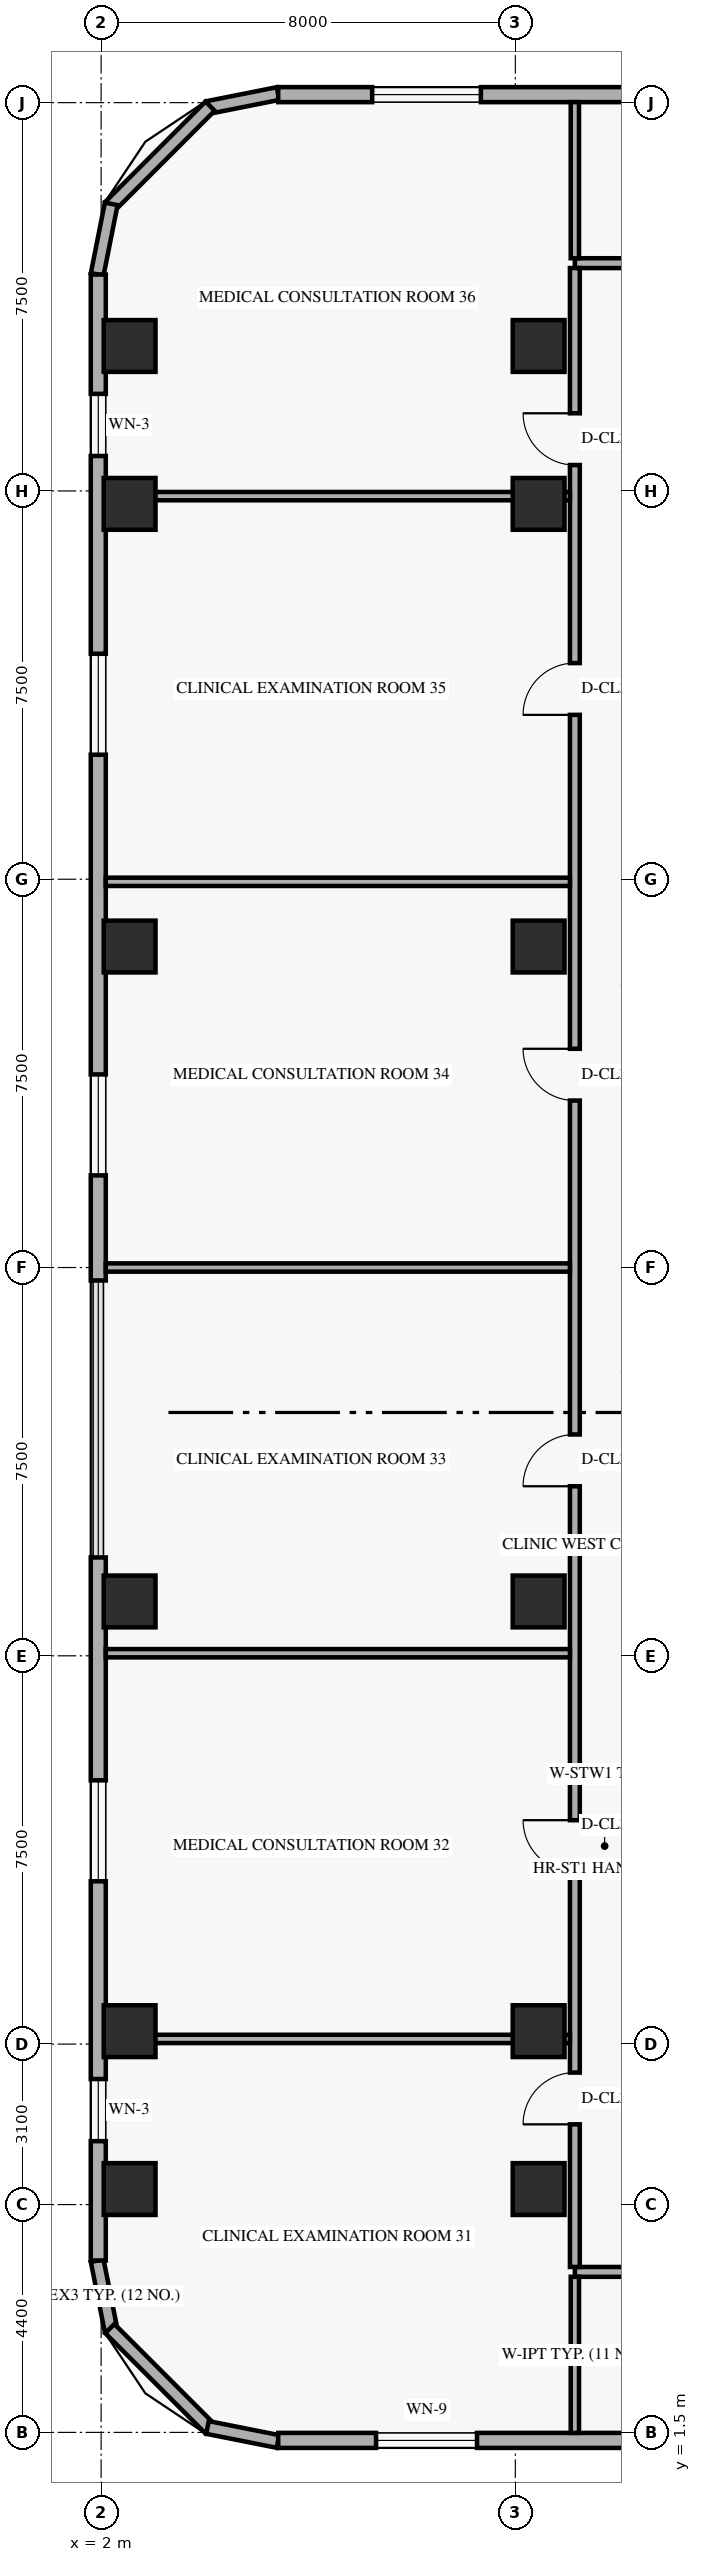
"""IFC4 building model, lengths in metres.
Left out: names, types, materials, properties, quantities, classifications, styles, units other than length and angle.
Written with IfcOpenShell. Run it as: python <this file> out.ifc"""

import sys

from ifc_helpers import new_model, si_unit, direction, frame, frame_2d, origin, origin_2d, place, context, subcontext, project, spatial, rectangle, extrude, element, fill, save


model = new_model("IFC4")
c1 = context("Model", 3, precision=1e-05, world=origin(), true_north=direction((0.0, 1.0)))
c2 = subcontext(c1, "Body", "Model", "MODEL_VIEW")
j1 = project(units=[si_unit("LENGTHUNIT", "METRE"), si_unit("PLANEANGLEUNIT", "RADIAN")], contexts=[c1])
p1 = place(None, origin())
s1 = spatial("IfcSite", under=j1, at=p1, CompositionType="ELEMENT")
p2 = place(p1, origin())
s2 = spatial("IfcBuilding", under=s1, at=p2, CompositionType="ELEMENT")
p3 = place(p2, frame((0.0, 0.0, 14.4)))
s3 = spatial("IfcBuildingStorey", under=s2, at=p3, CompositionType="ELEMENT", Elevation=14.4)
for number, where, z_axis, x_axis in (
    (1, (2.55, 6.2, 0.0), (0.0, 0.0, 1.0), (1.0, 0.0, 0.0)),
    (2, (2.55, 9.25, 0.0), (0.0, 0.0, 1.0), (1.0, 0.0, 0.0)),
    (3, (2.55, 17.55, 0.0), (0.0, 0.0, 1.0), (1.0, 0.0, 0.0)),
    (4, (2.55, 30.2, 0.0), (0.0, 0.0, 1.0), (1.0, 0.0, 0.0)),
    (5, (2.55, 38.75, 0.0), (0.0, 0.0, 1.0), (1.0, 0.0, 0.0)),
    (6, (2.55, 41.8, 0.0), (0.0, 0.0, 1.0), (1.0, 0.0, 0.0)),
    (7, (10.45, 6.2, 0.0), (0.0, 0.0, 1.0), (1.0, 0.0, 0.0)),
    (8, (10.45, 9.25, 0.0), (0.0, 0.0, 1.0), (1.0, 0.0, 0.0)),
    (9, (10.45, 17.55, 0.0), (0.0, 0.0, 1.0), (1.0, 0.0, 0.0)),
    (10, (10.45, 30.2, 0.0), (0.0, 0.0, 1.0), (1.0, 0.0, 0.0)),
    (11, (10.45, 38.75, 0.0), (0.0, 0.0, 1.0), (1.0, 0.0, 0.0)),
    (12, (10.45, 41.8, 0.0), (0.0, 0.0, 1.0), (1.0, 0.0, 0.0)),
):
    element("IfcColumn", number, at=place(p3, frame(where, z_axis=z_axis, x_axis=x_axis)), inside=s3, PredefinedType="COLUMN", context=c2, shape_type="SweptSolid", body=[
        extrude(rectangle(XDim=1.0, YDim=1.0, at=origin_2d()), origin(), (0.0, 0.0, 1.0), 4.8),
    ])
p4 = place(p3, frame((1.924, 4.816, 0.0), z_axis=(0.0, 0.0, 1.0), x_axis=(0.195000137217, -0.980803214965, 0.0)))
e13 = element("IfcWall", 13, at=p4, inside=s3, PredefinedType="SOLIDWALL", context=c2, shape_type="SweptSolid", body=[
    extrude(rectangle(XDim=1.388, YDim=0.25, at=frame_2d((0.694, 0.0))), origin(), (0.0, 0.0, 1.0), 4.39),
])
p5 = place(p3, frame((2.168, 3.505, 0.0), z_axis=(0.0, 0.0, 1.0), x_axis=(0.707151344399, -0.707062215165, 0.0)))
e14 = element("IfcWall", 14, at=p5, inside=s3, PredefinedType="SOLIDWALL", context=c2, shape_type="SweptSolid", body=[
    extrude(rectangle(XDim=2.739, YDim=0.25, at=frame_2d((1.37, 0.0))), origin(), (0.0, 0.0, 1.0), 4.39),
])
for number, where, z_axis, x_axis in (
    (15, (4.054, 1.595, 0.0), (0.0, 0.0, 1.0), (0.981, -0.195, 0.0)),
    (16, (5.417, 46.676, 0.0), (0.0, 0.0, 1.0), (-0.981, -0.195, 0.0)),
):
    element("IfcWall", number, at=place(p3, frame(where, z_axis=z_axis, x_axis=x_axis)), inside=s3, PredefinedType="SOLIDWALL", context=c2, shape_type="SweptSolid", body=[
        extrude(rectangle(XDim=1.389, YDim=0.25, at=frame_2d((0.694, 0.0))), origin(), (0.0, 0.0, 1.0), 4.39),
    ])
p6 = place(p3, frame((4.105, 46.432, 0.0), z_axis=(0.0, 0.0, 1.0), x_axis=(-0.707151344399, -0.707062215165, 0.0)))
e17 = element("IfcWall", 17, at=p6, inside=s3, PredefinedType="SOLIDWALL", context=c2, shape_type="SweptSolid", body=[
    extrude(rectangle(XDim=2.739, YDim=0.25, at=frame_2d((1.37, 0.0))), origin(), (0.0, 0.0, 1.0), 4.39),
])
p7 = place(p3, frame((2.195, 44.545, 0.0), z_axis=(0.0, 0.0, 1.0), x_axis=(-0.195000137217, -0.980803214965, 0.0)))
e18 = element("IfcWall", 18, at=p7, inside=s3, PredefinedType="SOLIDWALL", context=c2, shape_type="SweptSolid", body=[
    extrude(rectangle(XDim=1.388, YDim=0.25, at=frame_2d((0.694, 0.0))), origin(), (0.0, 0.0, 1.0), 4.39),
])
p8 = place(p3, frame((5.42, 1.345, 0.0), z_axis=(0.0, 0.0, 1.0), x_axis=(1.0, 0.0, 0.0)))
e19 = element("IfcWall", 19, at=p8, inside=s3, PredefinedType="SOLIDWALL", context=c2, shape_type="SweptSolid", body=[
    extrude(rectangle(XDim=19.58, YDim=0.29, at=frame_2d((9.79, 0.0))), origin(), (0.0, 0.0, 1.0), 4.39),
])
p9 = place(p8, frame((1.89, 0.0, 0.85)))
e20 = element("IfcOpeningElement", 20, at=p9, cuts=e19, PredefinedType="OPENING", context=c2, shape_type="SweptSolid", body=[
    extrude(rectangle(XDim=1.95, YDim=1.75, at=frame_2d((0.975, 0.875))), frame((0.0, 0.155, 0.0), z_axis=(0.0, -1.0, 0.0), x_axis=(1.0, 0.0, 0.0)), (0.0, 0.0, 1.0), 0.31),
])
p10 = place(p8, frame((11.68, 0.0, 0.85)))
e21 = element("IfcOpeningElement", 21, at=p10, cuts=e19, PredefinedType="OPENING", context=c2, shape_type="SweptSolid", body=[
    extrude(rectangle(XDim=1.95, YDim=1.75, at=frame_2d((0.975, 0.875))), frame((0.0, 0.155, 0.0), z_axis=(0.0, -1.0, 0.0), x_axis=(1.0, 0.0, 0.0)), (0.0, 0.0, 1.0), 0.31),
])
p11 = place(p3, frame((48.18, 46.655, 0.0), z_axis=(0.0, 0.0, 1.0), x_axis=(-1.0, 0.0, 0.0)))
e22 = element("IfcWall", 22, at=p11, inside=s3, PredefinedType="SOLIDWALL", context=c2, shape_type="SweptSolid", body=[
    extrude(rectangle(XDim=42.76, YDim=0.29, at=frame_2d((21.38, 0.0))), origin(), (0.0, 0.0, 1.0), 4.39),
])
p12 = place(p11, frame((38.845, 0.0, 0.85)))
e23 = element("IfcOpeningElement", 23, at=p12, cuts=e22, PredefinedType="OPENING", context=c2, shape_type="SweptSolid", body=[
    extrude(rectangle(XDim=2.1, YDim=1.75, at=frame_2d((1.05, 0.875))), frame((0.0, 0.155, 0.0), z_axis=(0.0, -1.0, 0.0), x_axis=(1.0, 0.0, 0.0)), (0.0, 0.0, 1.0), 0.31),
])
p13 = place(p11, frame((22.78, 0.0, 0.85)))
e24 = element("IfcOpeningElement", 24, at=p13, cuts=e22, PredefinedType="OPENING", context=c2, shape_type="SweptSolid", body=[
    extrude(rectangle(XDim=2.1, YDim=1.75, at=frame_2d((1.05, 0.875))), frame((0.0, 0.155, 0.0), z_axis=(0.0, -1.0, 0.0), x_axis=(1.0, 0.0, 0.0)), (0.0, 0.0, 1.0), 0.31),
])
p14 = place(p11, frame((4.265, 0.0, 0.85)))
e25 = element("IfcOpeningElement", 25, at=p14, cuts=e22, PredefinedType="OPENING", context=c2, shape_type="SweptSolid", body=[
    extrude(rectangle(XDim=2.1, YDim=1.75, at=frame_2d((1.05, 0.875))), frame((0.0, 0.155, 0.0), z_axis=(0.0, -1.0, 0.0), x_axis=(1.0, 0.0, 0.0)), (0.0, 0.0, 1.0), 0.31),
])
p15 = place(p3, frame((1.945, 43.18, 0.0), z_axis=(0.0, 0.0, 1.0), x_axis=(0.0, -1.0, 0.0)))
e26 = element("IfcWall", 26, at=p15, inside=s3, PredefinedType="SOLIDWALL", context=c2, shape_type="SweptSolid", body=[
    extrude(rectangle(XDim=19.43, YDim=0.29, at=frame_2d((9.715, 0.0))), origin(), (0.0, 0.0, 1.0), 4.39),
])
p16 = place(p15, frame((15.45, 0.0, 0.85)))
e27 = element("IfcOpeningElement", 27, at=p16, cuts=e26, PredefinedType="OPENING", context=c2, shape_type="SweptSolid", body=[
    extrude(rectangle(XDim=1.95, YDim=1.75, at=frame_2d((0.975, 0.875))), frame((0.0, 0.155, 0.0), z_axis=(0.0, -1.0, 0.0), x_axis=(1.0, 0.0, 0.0)), (0.0, 0.0, 1.0), 0.31),
])
p17 = place(p15, frame((7.325, 0.0, 0.85)))
e28 = element("IfcOpeningElement", 28, at=p17, cuts=e26, PredefinedType="OPENING", context=c2, shape_type="SweptSolid", body=[
    extrude(rectangle(XDim=1.95, YDim=1.75, at=frame_2d((0.975, 0.875))), frame((0.0, 0.155, 0.0), z_axis=(0.0, -1.0, 0.0), x_axis=(1.0, 0.0, 0.0)), (0.0, 0.0, 1.0), 0.31),
])
p18 = place(p15, frame((2.305, 0.0, 0.85)))
e29 = element("IfcOpeningElement", 29, at=p18, cuts=e26, PredefinedType="OPENING", context=c2, shape_type="SweptSolid", body=[
    extrude(rectangle(XDim=1.2, YDim=1.5, at=frame_2d((0.6, 0.75))), frame((0.0, 0.155, 0.0), z_axis=(0.0, -1.0, 0.0), x_axis=(1.0, 0.0, 0.0)), (0.0, 0.0, 1.0), 0.31),
])
p19 = place(p3, frame((1.945, 18.4, 0.0), z_axis=(0.0, 0.0, 1.0), x_axis=(0.0, -1.0, 0.0)))
e30 = element("IfcWall", 30, at=p19, inside=s3, PredefinedType="SOLIDWALL", context=c2, shape_type="SweptSolid", body=[
    extrude(rectangle(XDim=13.58, YDim=0.29, at=frame_2d((6.79, 0.0))), origin(), (0.0, 0.0, 1.0), 4.39),
])
p20 = place(p19, frame((10.075, 0.0, 0.85)))
e31 = element("IfcOpeningElement", 31, at=p20, cuts=e30, PredefinedType="OPENING", context=c2, shape_type="SweptSolid", body=[
    extrude(rectangle(XDim=1.2, YDim=1.5, at=frame_2d((0.6, 0.75))), frame((0.0, 0.155, 0.0), z_axis=(0.0, -1.0, 0.0), x_axis=(1.0, 0.0, 0.0)), (0.0, 0.0, 1.0), 0.31),
])
p21 = place(p19, frame((4.305, 0.0, 0.85)))
e32 = element("IfcOpeningElement", 32, at=p21, cuts=e30, PredefinedType="OPENING", context=c2, shape_type="SweptSolid", body=[
    extrude(rectangle(XDim=1.95, YDim=1.75, at=frame_2d((0.975, 0.875))), frame((0.0, 0.155, 0.0), z_axis=(0.0, -1.0, 0.0), x_axis=(1.0, 0.0, 0.0)), (0.0, 0.0, 1.0), 0.31),
])
for number, where, z_axis, x_axis in (
    (33, (11.15, 4.6, 0.0), (0.0, 0.0, 1.0), (1.0, 0.0, 0.0)),
    (34, (11.15, 43.4, 0.0), (0.0, 0.0, 1.0), (1.0, 0.0, 0.0)),
):
    element("IfcWall", number, at=place(p3, frame(where, z_axis=z_axis, x_axis=x_axis)), inside=s3, PredefinedType="STANDARD", context=c2, shape_type="SweptSolid", body=[
        extrude(rectangle(XDim=1.85, YDim=0.19, at=frame_2d((0.925, 0.0))), origin(), (0.0, 0.0, 1.0), 4.39),
    ])
p22 = place(p3, frame((11.15, 4.695, 0.0), z_axis=(0.0, 0.0, 1.0), x_axis=(0.0, 1.0, 0.0)))
e35 = element("IfcWall", 35, at=p22, inside=s3, PredefinedType="STANDARD", context=c2, shape_type="SweptSolid", body=[
    extrude(rectangle(XDim=38.61, YDim=0.19, at=frame_2d((19.305, 0.0))), origin(), (0.0, 0.0, 1.0), 3.445),
])
p23 = place(p22, frame((2.755, 0.0, 0.0)))
e36 = element("IfcOpeningElement", 36, at=p23, cuts=e35, PredefinedType="OPENING", context=c2, shape_type="SweptSolid", body=[
    extrude(rectangle(XDim=1.0, YDim=2.15, at=frame_2d((0.5, 1.075))), frame((0.0, 0.105, 0.0), z_axis=(0.0, -1.0, 0.0), x_axis=(1.0, 0.0, 0.0)), (0.0, 0.0, 1.0), 0.21),
])
p24 = place(p22, frame((7.63, 0.0, 0.0)))
e37 = element("IfcOpeningElement", 37, at=p24, cuts=e35, PredefinedType="OPENING", context=c2, shape_type="SweptSolid", body=[
    extrude(rectangle(XDim=1.0, YDim=2.15, at=frame_2d((0.5, 1.075))), frame((0.0, 0.105, 0.0), z_axis=(0.0, -1.0, 0.0), x_axis=(1.0, 0.0, 0.0)), (0.0, 0.0, 1.0), 0.21),
])
p25 = place(p22, frame((15.08, 0.0, 0.0)))
e38 = element("IfcOpeningElement", 38, at=p25, cuts=e35, PredefinedType="OPENING", context=c2, shape_type="SweptSolid", body=[
    extrude(rectangle(XDim=1.0, YDim=2.15, at=frame_2d((0.5, 1.075))), frame((0.0, 0.105, 0.0), z_axis=(0.0, -1.0, 0.0), x_axis=(1.0, 0.0, 0.0)), (0.0, 0.0, 1.0), 0.21),
])
p26 = place(p22, frame((22.53, 0.0, 0.0)))
e39 = element("IfcOpeningElement", 39, at=p26, cuts=e35, PredefinedType="OPENING", context=c2, shape_type="SweptSolid", body=[
    extrude(rectangle(XDim=1.0, YDim=2.15, at=frame_2d((0.5, 1.075))), frame((0.0, 0.105, 0.0), z_axis=(0.0, -1.0, 0.0), x_axis=(1.0, 0.0, 0.0)), (0.0, 0.0, 1.0), 0.21),
])
p27 = place(p22, frame((29.98, 0.0, 0.0)))
e40 = element("IfcOpeningElement", 40, at=p27, cuts=e35, PredefinedType="OPENING", context=c2, shape_type="SweptSolid", body=[
    extrude(rectangle(XDim=1.0, YDim=2.15, at=frame_2d((0.5, 1.075))), frame((0.0, 0.105, 0.0), z_axis=(0.0, -1.0, 0.0), x_axis=(1.0, 0.0, 0.0)), (0.0, 0.0, 1.0), 0.21),
])
p28 = place(p22, frame((34.805, 0.0, 0.0)))
e41 = element("IfcOpeningElement", 41, at=p28, cuts=e35, PredefinedType="OPENING", context=c2, shape_type="SweptSolid", body=[
    extrude(rectangle(XDim=1.0, YDim=2.15, at=frame_2d((0.5, 1.075))), frame((0.0, 0.105, 0.0), z_axis=(0.0, -1.0, 0.0), x_axis=(1.0, 0.0, 0.0)), (0.0, 0.0, 1.0), 0.21),
])
for number, where, z_axis, x_axis in (
    (42, (11.15, 1.49, 0.0), (0.0, 0.0, 1.0), (0.0, 1.0, 0.0)),
    (43, (11.15, 43.495, 0.0), (0.0, 0.0, 1.0), (0.0, 1.0, 0.0)),
):
    element("IfcWall", number, at=place(p3, frame(where, z_axis=z_axis, x_axis=x_axis)), inside=s3, PredefinedType="PARTITIONING", context=c2, shape_type="SweptSolid", body=[
        extrude(rectangle(XDim=3.015, YDim=0.16, at=frame_2d((1.507, 0.0))), origin(), (0.0, 0.0, 1.0), 4.39),
    ])
p29 = place(p3, frame((2.09, 9.1, 0.0), z_axis=(0.0, 0.0, 1.0), x_axis=(1.0, 0.0, 0.0)))
e44 = element("IfcWall", 44, at=p29, inside=s3, PredefinedType="PARTITIONING", context=c2, shape_type="SweptSolid", body=[
    extrude(rectangle(XDim=8.965, YDim=0.16, at=frame_2d((4.482, 0.0))), origin(), (0.0, 0.0, 1.0), 3.445),
])
for number, where, z_axis, x_axis in (
    (45, (2.09, 16.55, 0.0), (0.0, 0.0, 1.0), (1.0, 0.0, 0.0)),
    (46, (2.09, 24.0, 0.0), (0.0, 0.0, 1.0), (1.0, 0.0, 0.0)),
    (47, (2.09, 31.45, 0.0), (0.0, 0.0, 1.0), (1.0, 0.0, 0.0)),
):
    element("IfcWall", number, at=place(p3, frame(where, z_axis=z_axis, x_axis=x_axis)), inside=s3, PredefinedType="PARTITIONING", context=c2, shape_type="SweptSolid", body=[
        extrude(rectangle(XDim=8.965, YDim=0.16, at=frame_2d((4.482, 0.0))), origin(), (0.0, 0.0, 1.0), 3.602),
    ])
p30 = place(p3, frame((2.09, 38.9, 0.0), z_axis=(0.0, 0.0, 1.0), x_axis=(1.0, 0.0, 0.0)))
e48 = element("IfcWall", 48, at=p30, inside=s3, PredefinedType="PARTITIONING", context=c2, shape_type="SweptSolid", body=[
    extrude(rectangle(XDim=8.965, YDim=0.16, at=frame_2d((4.482, 0.0))), origin(), (0.0, 0.0, 1.0), 3.445),
])
p31 = place(p9, origin())
e49 = element("IfcWindow", 49, at=p31, inside=s3, PartitioningType="SINGLE_PANEL", PredefinedType="WINDOW", context=c2, shape_type="SweptSolid", body=[
    extrude(rectangle(XDim=1.95, YDim=1.75, at=frame_2d((0.975, 0.875))), frame((0.0, 0.03, 0.0), z_axis=(0.0, -1.0, 0.0), x_axis=(1.0, 0.0, 0.0)), (0.0, 0.0, 1.0), 0.06),
])
fill(e20, e49)
p32 = place(p12, origin())
e50 = element("IfcWindow", 50, at=p32, inside=s3, PartitioningType="SINGLE_PANEL", PredefinedType="WINDOW", context=c2, shape_type="SweptSolid", body=[
    extrude(rectangle(XDim=2.1, YDim=1.75, at=frame_2d((1.05, 0.875))), frame((0.0, 0.03, 0.0), z_axis=(0.0, -1.0, 0.0), x_axis=(1.0, 0.0, 0.0)), (0.0, 0.0, 1.0), 0.06),
])
fill(e23, e50)
p33 = place(p16, origin())
e51 = element("IfcWindow", 51, at=p33, inside=s3, PartitioningType="SINGLE_PANEL", PredefinedType="WINDOW", context=c2, shape_type="SweptSolid", body=[
    extrude(rectangle(XDim=1.95, YDim=1.75, at=frame_2d((0.975, 0.875))), frame((0.0, 0.03, 0.0), z_axis=(0.0, -1.0, 0.0), x_axis=(1.0, 0.0, 0.0)), (0.0, 0.0, 1.0), 0.06),
])
fill(e27, e51)
p34 = place(p17, origin())
e52 = element("IfcWindow", 52, at=p34, inside=s3, PartitioningType="SINGLE_PANEL", PredefinedType="WINDOW", context=c2, shape_type="SweptSolid", body=[
    extrude(rectangle(XDim=1.95, YDim=1.75, at=frame_2d((0.975, 0.875))), frame((0.0, 0.03, 0.0), z_axis=(0.0, -1.0, 0.0), x_axis=(1.0, 0.0, 0.0)), (0.0, 0.0, 1.0), 0.06),
])
fill(e28, e52)
p35 = place(p18, origin())
e53 = element("IfcWindow", 53, at=p35, inside=s3, PartitioningType="SINGLE_PANEL", PredefinedType="WINDOW", context=c2, shape_type="SweptSolid", body=[
    extrude(rectangle(XDim=1.2, YDim=1.5, at=frame_2d((0.6, 0.75))), frame((0.0, 0.03, 0.0), z_axis=(0.0, -1.0, 0.0), x_axis=(1.0, 0.0, 0.0)), (0.0, 0.0, 1.0), 0.06),
])
fill(e29, e53)
p36 = place(p20, origin())
e54 = element("IfcWindow", 54, at=p36, inside=s3, PartitioningType="SINGLE_PANEL", PredefinedType="WINDOW", context=c2, shape_type="SweptSolid", body=[
    extrude(rectangle(XDim=1.2, YDim=1.5, at=frame_2d((0.6, 0.75))), frame((0.0, 0.03, 0.0), z_axis=(0.0, -1.0, 0.0), x_axis=(1.0, 0.0, 0.0)), (0.0, 0.0, 1.0), 0.06),
])
fill(e31, e54)
p37 = place(p21, origin())
e55 = element("IfcWindow", 55, at=p37, inside=s3, PartitioningType="SINGLE_PANEL", PredefinedType="WINDOW", context=c2, shape_type="SweptSolid", body=[
    extrude(rectangle(XDim=1.95, YDim=1.75, at=frame_2d((0.975, 0.875))), frame((0.0, 0.03, 0.0), z_axis=(0.0, -1.0, 0.0), x_axis=(1.0, 0.0, 0.0)), (0.0, 0.0, 1.0), 0.06),
])
fill(e32, e55)
p38 = place(p23, origin())
e56 = element("IfcDoor", 56, at=p38, inside=s3, OperationType="SINGLE_SWING_LEFT", PredefinedType="DOOR", context=c2, shape_type="SweptSolid", body=[
    extrude(rectangle(XDim=1.0, YDim=2.15, at=frame_2d((0.5, 1.075))), frame((0.0, 0.025, 0.0), z_axis=(0.0, -1.0, 0.0), x_axis=(1.0, 0.0, 0.0)), (0.0, 0.0, 1.0), 0.05),
])
fill(e36, e56)
p39 = place(p24, origin())
e57 = element("IfcDoor", 57, at=p39, inside=s3, OperationType="SINGLE_SWING_RIGHT", PredefinedType="DOOR", context=c2, shape_type="SweptSolid", body=[
    extrude(rectangle(XDim=1.0, YDim=2.15, at=frame_2d((0.5, 1.075))), frame((0.0, 0.025, 0.0), z_axis=(0.0, -1.0, 0.0), x_axis=(1.0, 0.0, 0.0)), (0.0, 0.0, 1.0), 0.05),
])
fill(e37, e57)
p40 = place(p25, origin())
e58 = element("IfcDoor", 58, at=p40, inside=s3, OperationType="SINGLE_SWING_LEFT", PredefinedType="DOOR", context=c2, shape_type="SweptSolid", body=[
    extrude(rectangle(XDim=1.0, YDim=2.15, at=frame_2d((0.5, 1.075))), frame((0.0, 0.025, 0.0), z_axis=(0.0, -1.0, 0.0), x_axis=(1.0, 0.0, 0.0)), (0.0, 0.0, 1.0), 0.05),
])
fill(e38, e58)
p41 = place(p26, origin())
e59 = element("IfcDoor", 59, at=p41, inside=s3, OperationType="SINGLE_SWING_RIGHT", PredefinedType="DOOR", context=c2, shape_type="SweptSolid", body=[
    extrude(rectangle(XDim=1.0, YDim=2.15, at=frame_2d((0.5, 1.075))), frame((0.0, 0.025, 0.0), z_axis=(0.0, -1.0, 0.0), x_axis=(1.0, 0.0, 0.0)), (0.0, 0.0, 1.0), 0.05),
])
fill(e39, e59)
p42 = place(p27, origin())
e60 = element("IfcDoor", 60, at=p42, inside=s3, OperationType="SINGLE_SWING_LEFT", PredefinedType="DOOR", context=c2, shape_type="SweptSolid", body=[
    extrude(rectangle(XDim=1.0, YDim=2.15, at=frame_2d((0.5, 1.075))), frame((0.0, 0.025, 0.0), z_axis=(0.0, -1.0, 0.0), x_axis=(1.0, 0.0, 0.0)), (0.0, 0.0, 1.0), 0.05),
])
fill(e40, e60)
p43 = place(p28, origin())
e61 = element("IfcDoor", 61, at=p43, inside=s3, OperationType="SINGLE_SWING_RIGHT", PredefinedType="DOOR", context=c2, shape_type="SweptSolid", body=[
    extrude(rectangle(XDim=1.0, YDim=2.15, at=frame_2d((0.5, 1.075))), frame((0.0, 0.025, 0.0), z_axis=(0.0, -1.0, 0.0), x_axis=(1.0, 0.0, 0.0)), (0.0, 0.0, 1.0), 0.05),
])
fill(e41, e61)
save(model, sys.argv[1])
